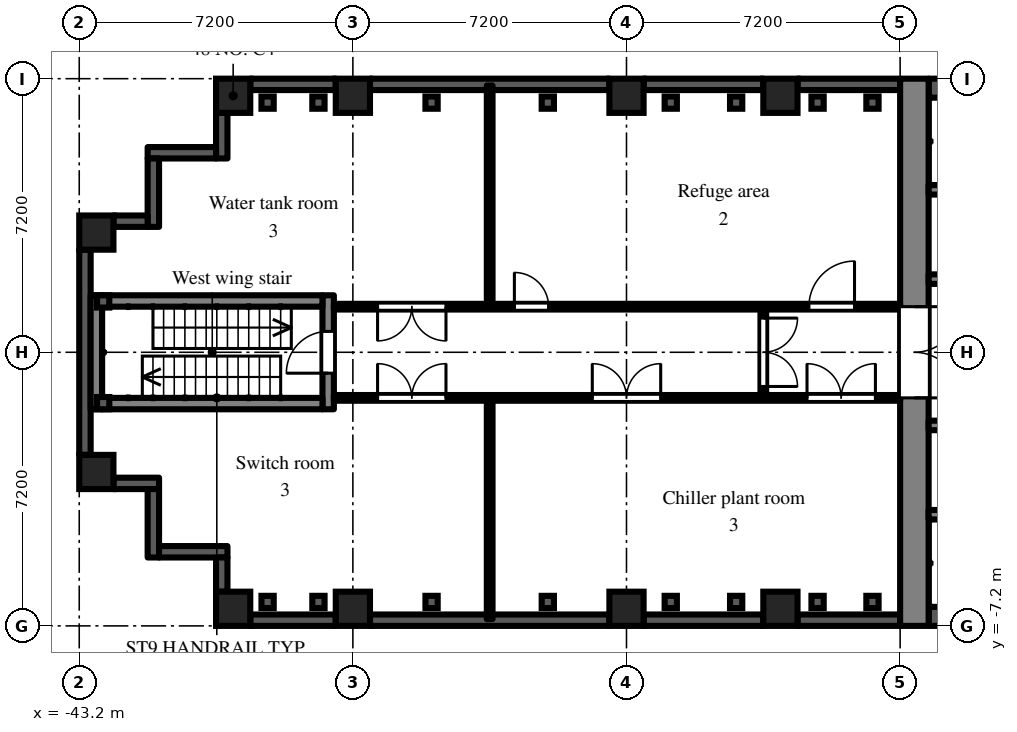
"""IFC4 building model, lengths in metres.
Left out: names, types, materials, properties, quantities, classifications, styles, units other than length and angle.
Written with IfcOpenShell. Run it as: python <this file> out.ifc"""

import sys

from ifc_helpers import new_model, si_unit, direction, frame, frame_2d, origin, origin_2d, place, context, subcontext, project, spatial, rectangle, extrude, element, fill, save


model = new_model("IFC4")
c1 = context("Model", 3, precision=1e-05, world=origin(), true_north=direction((0.0, 1.0)))
c2 = subcontext(c1, "Body", "Model", "MODEL_VIEW")
j1 = project(units=[si_unit("LENGTHUNIT", "METRE"), si_unit("PLANEANGLEUNIT", "RADIAN")], contexts=[c1])
p1 = place(None, origin())
s1 = spatial("IfcSite", under=j1, at=p1, CompositionType="ELEMENT")
p2 = place(p1, origin())
s2 = spatial("IfcBuilding", under=s1, at=p2, CompositionType="ELEMENT")
p3 = place(p2, frame((0.0, 0.0, 111.9)))
s3 = spatial("IfcBuildingStorey", under=s2, at=p3, CompositionType="ELEMENT", Elevation=111.9)
for number, where, z_axis, x_axis in (
    (1, (-42.75, -3.15, 0.0), (0.0, 0.0, 1.0), (1.0, 0.0, 0.0)),
    (2, (-42.75, 3.15, 0.0), (0.0, 0.0, 1.0), (1.0, 0.0, 0.0)),
    (3, (-39.15, -6.75, 0.0), (0.0, 0.0, 1.0), (1.0, 0.0, 0.0)),
    (4, (-39.15, 6.75, 0.0), (0.0, 0.0, 1.0), (1.0, 0.0, 0.0)),
    (5, (-36.0, -6.75, 0.0), (0.0, 0.0, 1.0), (1.0, 0.0, 0.0)),
    (6, (-36.0, 6.75, 0.0), (0.0, 0.0, 1.0), (1.0, 0.0, 0.0)),
    (7, (-28.8, -6.75, 0.0), (0.0, 0.0, 1.0), (1.0, 0.0, 0.0)),
    (8, (-28.8, 6.75, 0.0), (0.0, 0.0, 1.0), (1.0, 0.0, 0.0)),
    (9, (-24.75, -6.75, 0.0), (0.0, 0.0, 1.0), (1.0, 0.0, 0.0)),
    (10, (-24.75, 6.75, 0.0), (0.0, 0.0, 1.0), (1.0, 0.0, 0.0)),
):
    element("IfcColumn", number, at=place(p3, frame(where, z_axis=z_axis, x_axis=x_axis)), inside=s3, PredefinedType="COLUMN", context=c2, shape_type="SweptSolid", body=[
        extrude(rectangle(XDim=0.9, YDim=0.9, at=origin_2d()), origin(), (0.0, 0.0, 1.0), 4.2),
    ])
p4 = place(p3, frame((-21.6, 7.05, 0.0), z_axis=(0.0, 0.0, 1.0), x_axis=(-1.0, 0.0, 0.0)))
e11 = element("IfcWall", 11, at=p4, inside=s3, PredefinedType="SOLIDWALL", context=c2, shape_type="SweptSolid", body=[
    extrude(rectangle(XDim=2.7, YDim=0.3, at=frame_2d((1.35, 0.0))), origin(), (0.0, 0.0, 1.0), 3.4),
])
p5 = place(p3, frame((-25.2, 7.05, 0.0), z_axis=(0.0, 0.0, 1.0), x_axis=(-1.0, 0.0, 0.0)))
e12 = element("IfcWall", 12, at=p5, inside=s3, PredefinedType="SOLIDWALL", context=c2, shape_type="SweptSolid", body=[
    extrude(rectangle(XDim=3.15, YDim=0.3, at=frame_2d((1.575, 0.0))), origin(), (0.0, 0.0, 1.0), 3.4),
])
p6 = place(p3, frame((-29.25, 7.05, 0.0), z_axis=(0.0, 0.0, 1.0), x_axis=(-1.0, 0.0, 0.0)))
e13 = element("IfcWall", 13, at=p6, inside=s3, PredefinedType="SOLIDWALL", context=c2, shape_type="SweptSolid", body=[
    extrude(rectangle(XDim=6.3, YDim=0.3, at=frame_2d((3.15, 0.0))), origin(), (0.0, 0.0, 1.0), 3.4),
])
p7 = place(p3, frame((-36.45, 7.05, 0.0), z_axis=(0.0, 0.0, 1.0), x_axis=(-1.0, 0.0, 0.0)))
e14 = element("IfcWall", 14, at=p7, inside=s3, PredefinedType="SOLIDWALL", context=c2, shape_type="SweptSolid", body=[
    extrude(rectangle(XDim=2.25, YDim=0.3, at=frame_2d((1.125, 0.0))), origin(), (0.0, 0.0, 1.0), 3.4),
])
p8 = place(p3, frame((-39.45, 6.3, 0.0), z_axis=(0.0, 0.0, 1.0), x_axis=(0.0, -1.0, 0.0)))
e15 = element("IfcWall", 15, at=p8, inside=s3, PredefinedType="SOLIDWALL", context=c2, shape_type="SweptSolid", body=[
    extrude(rectangle(XDim=1.2, YDim=0.3, at=frame_2d((0.6, 0.0))), origin(), (0.0, 0.0, 1.0), 3.8),
])
p9 = place(p3, frame((-39.6, 5.25, 0.0), z_axis=(0.0, 0.0, 1.0), x_axis=(-1.0, 0.0, 0.0)))
e16 = element("IfcWall", 16, at=p9, inside=s3, PredefinedType="SOLIDWALL", context=c2, shape_type="SweptSolid", body=[
    extrude(rectangle(XDim=1.8, YDim=0.3, at=frame_2d((0.9, 0.0))), origin(), (0.0, 0.0, 1.0), 3.8),
])
p10 = place(p3, frame((-41.25, 5.1, 0.0), z_axis=(0.0, 0.0, 1.0), x_axis=(0.0, -1.0, 0.0)))
e17 = element("IfcWall", 17, at=p10, inside=s3, PredefinedType="SOLIDWALL", context=c2, shape_type="SweptSolid", body=[
    extrude(rectangle(XDim=1.8, YDim=0.3, at=frame_2d((0.9, 0.0))), origin(), (0.0, 0.0, 1.0), 3.8),
])
p11 = place(p3, frame((-41.4, 3.45, 0.0), z_axis=(0.0, 0.0, 1.0), x_axis=(-1.0, 0.0, 0.0)))
e18 = element("IfcWall", 18, at=p11, inside=s3, PredefinedType="SOLIDWALL", context=c2, shape_type="SweptSolid", body=[
    extrude(rectangle(XDim=0.9, YDim=0.3, at=frame_2d((0.45, 0.0))), origin(), (0.0, 0.0, 1.0), 3.8),
])
p12 = place(p3, frame((-43.05, 2.7, 0.0), z_axis=(0.0, 0.0, 1.0), x_axis=(0.0, -1.0, 0.0)))
e19 = element("IfcWall", 19, at=p12, inside=s3, PredefinedType="SOLIDWALL", context=c2, shape_type="SweptSolid", body=[
    extrude(rectangle(XDim=5.4, YDim=0.3, at=frame_2d((2.7, 0.0))), origin(), (0.0, 0.0, 1.0), 3.4),
])
p13 = place(p3, frame((-42.3, -3.45, 0.0), z_axis=(0.0, 0.0, 1.0), x_axis=(1.0, 0.0, 0.0)))
e20 = element("IfcWall", 20, at=p13, inside=s3, PredefinedType="SOLIDWALL", context=c2, shape_type="SweptSolid", body=[
    extrude(rectangle(XDim=1.2, YDim=0.3, at=frame_2d((0.6, 0.0))), origin(), (0.0, 0.0, 1.0), 3.8),
])
p14 = place(p3, frame((-41.25, -3.6, 0.0), z_axis=(0.0, 0.0, 1.0), x_axis=(0.0, -1.0, 0.0)))
e21 = element("IfcWall", 21, at=p14, inside=s3, PredefinedType="SOLIDWALL", context=c2, shape_type="SweptSolid", body=[
    extrude(rectangle(XDim=1.8, YDim=0.3, at=frame_2d((0.9, 0.0))), origin(), (0.0, 0.0, 1.0), 3.8),
])
p15 = place(p3, frame((-41.1, -5.25, 0.0), z_axis=(0.0, 0.0, 1.0), x_axis=(1.0, 0.0, 0.0)))
e22 = element("IfcWall", 22, at=p15, inside=s3, PredefinedType="SOLIDWALL", context=c2, shape_type="SweptSolid", body=[
    extrude(rectangle(XDim=1.8, YDim=0.3, at=frame_2d((0.9, 0.0))), origin(), (0.0, 0.0, 1.0), 3.8),
])
p16 = place(p3, frame((-39.45, -5.4, 0.0), z_axis=(0.0, 0.0, 1.0), x_axis=(0.0, -1.0, 0.0)))
e23 = element("IfcWall", 23, at=p16, inside=s3, PredefinedType="SOLIDWALL", context=c2, shape_type="SweptSolid", body=[
    extrude(rectangle(XDim=0.9, YDim=0.3, at=frame_2d((0.45, 0.0))), origin(), (0.0, 0.0, 1.0), 3.8),
])
p17 = place(p3, frame((-38.7, -7.05, 0.0), z_axis=(0.0, 0.0, 1.0), x_axis=(1.0, 0.0, 0.0)))
e24 = element("IfcWall", 24, at=p17, inside=s3, PredefinedType="SOLIDWALL", context=c2, shape_type="SweptSolid", body=[
    extrude(rectangle(XDim=2.25, YDim=0.3, at=frame_2d((1.125, 0.0))), origin(), (0.0, 0.0, 1.0), 3.4),
])
p18 = place(p3, frame((-35.55, -7.05, 0.0), z_axis=(0.0, 0.0, 1.0), x_axis=(1.0, 0.0, 0.0)))
e25 = element("IfcWall", 25, at=p18, inside=s3, PredefinedType="SOLIDWALL", context=c2, shape_type="SweptSolid", body=[
    extrude(rectangle(XDim=6.3, YDim=0.3, at=frame_2d((3.15, 0.0))), origin(), (0.0, 0.0, 1.0), 3.4),
])
p19 = place(p3, frame((-28.35, -7.05, 0.0), z_axis=(0.0, 0.0, 1.0), x_axis=(1.0, 0.0, 0.0)))
e26 = element("IfcWall", 26, at=p19, inside=s3, PredefinedType="SOLIDWALL", context=c2, shape_type="SweptSolid", body=[
    extrude(rectangle(XDim=3.15, YDim=0.3, at=frame_2d((1.575, 0.0))), origin(), (0.0, 0.0, 1.0), 3.4),
])
p20 = place(p3, frame((-24.3, -7.05, 0.0), z_axis=(0.0, 0.0, 1.0), x_axis=(1.0, 0.0, 0.0)))
e27 = element("IfcWall", 27, at=p20, inside=s3, PredefinedType="SOLIDWALL", context=c2, shape_type="SweptSolid", body=[
    extrude(rectangle(XDim=2.7, YDim=0.3, at=frame_2d((1.35, 0.0))), origin(), (0.0, 0.0, 1.0), 3.4),
])
p21 = place(p3, frame((-21.225, -7.2, 0.0), z_axis=(0.0, 0.0, 1.0), x_axis=(0.0, 1.0, 0.0)))
e28 = element("IfcWall", 28, at=p21, inside=s3, PredefinedType="SHEAR", context=c2, shape_type="SweptSolid", body=[
    extrude(rectangle(XDim=14.4, YDim=0.75, at=frame_2d((7.2, 0.0))), origin(), (0.0, 0.0, 1.0), 3.8),
])
p22 = place(p21, frame((6.0, 0.0, 0.0)))
e29 = element("IfcOpeningElement", 29, at=p22, cuts=e28, PredefinedType="OPENING", context=c2, shape_type="SweptSolid", body=[
    extrude(rectangle(XDim=2.4, YDim=2.2, at=frame_2d((1.2, 1.1))), frame((0.0, 0.385, 0.0), z_axis=(0.0, -1.0, 0.0), x_axis=(1.0, 0.0, 0.0)), (0.0, 0.0, 1.0), 0.77),
])
p23 = place(p3, frame((-7.9, 6.95, 0.0), z_axis=(0.0, 0.0, 1.0), x_axis=(-1.0, 0.0, 0.0)))
e30 = element("IfcWall", 30, at=p23, inside=s3, PredefinedType="SHEAR", context=c2, shape_type="SweptSolid", body=[
    extrude(rectangle(XDim=12.95, YDim=0.5, at=frame_2d((6.475, 0.0))), origin(), (0.0, 0.0, 1.0), 3.8),
])
p24 = place(p3, frame((-7.9, 1.925, 0.0), z_axis=(0.0, 0.0, 1.0), x_axis=(-1.0, 0.0, 0.0)))
e31 = element("IfcWall", 31, at=p24, inside=s3, PredefinedType="SHEAR", context=c2, shape_type="SweptSolid", body=[
    extrude(rectangle(XDim=12.95, YDim=0.25, at=frame_2d((6.475, 0.0))), origin(), (0.0, 0.0, 1.0), 3.8),
])
p25 = place(p24, frame((0.525, 0.0, 0.0)))
e32 = element("IfcOpeningElement", 32, at=p25, cuts=e31, PredefinedType="OPENING", context=c2, shape_type="SweptSolid", body=[
    extrude(rectangle(XDim=0.9, YDim=2.1, at=frame_2d((0.45, 1.05))), frame((0.0, 0.135, 0.0), z_axis=(0.0, -1.0, 0.0), x_axis=(1.0, 0.0, 0.0)), (0.0, 0.0, 1.0), 0.27),
])
p26 = place(p24, frame((2.625, 0.0, 0.0)))
e33 = element("IfcOpeningElement", 33, at=p26, cuts=e31, PredefinedType="OPENING", context=c2, shape_type="SweptSolid", body=[
    extrude(rectangle(XDim=1.1, YDim=2.1, at=frame_2d((0.55, 1.05))), frame((0.0, 0.135, 0.0), z_axis=(0.0, -1.0, 0.0), x_axis=(1.0, 0.0, 0.0)), (0.0, 0.0, 1.0), 0.27),
])
p27 = place(p3, frame((-12.3, 4.275, 0.0), z_axis=(0.0, 0.0, 1.0), x_axis=(-1.0, 0.0, 0.0)))
e34 = element("IfcWall", 34, at=p27, inside=s3, PredefinedType="SHEAR", context=c2, shape_type="SweptSolid", body=[
    extrude(rectangle(XDim=8.55, YDim=0.25, at=frame_2d((4.275, 0.0))), origin(), (0.0, 0.0, 1.0), 3.8),
])
p28 = place(p3, frame((-7.9, -6.95, 0.0), z_axis=(0.0, 0.0, 1.0), x_axis=(-1.0, 0.0, 0.0)))
e35 = element("IfcWall", 35, at=p28, inside=s3, PredefinedType="SHEAR", context=c2, shape_type="SweptSolid", body=[
    extrude(rectangle(XDim=12.95, YDim=0.5, at=frame_2d((6.475, 0.0))), origin(), (0.0, 0.0, 1.0), 3.8),
])
p29 = place(p3, frame((-7.9, -1.925, 0.0), z_axis=(0.0, 0.0, 1.0), x_axis=(-1.0, 0.0, 0.0)))
e36 = element("IfcWall", 36, at=p29, inside=s3, PredefinedType="SHEAR", context=c2, shape_type="SweptSolid", body=[
    extrude(rectangle(XDim=12.95, YDim=0.25, at=frame_2d((6.475, 0.0))), origin(), (0.0, 0.0, 1.0), 3.8),
])
p30 = place(p29, frame((4.825, 0.0, 0.0)))
e37 = element("IfcOpeningElement", 37, at=p30, cuts=e36, PredefinedType="OPENING", context=c2, shape_type="SweptSolid", body=[
    extrude(rectangle(XDim=1.1, YDim=2.1, at=frame_2d((0.55, 1.05))), frame((0.0, 0.135, 0.0), z_axis=(0.0, -1.0, 0.0), x_axis=(1.0, 0.0, 0.0)), (0.0, 0.0, 1.0), 0.27),
])
p31 = place(p29, frame((7.025, 0.0, 0.0)))
e38 = element("IfcOpeningElement", 38, at=p31, cuts=e36, PredefinedType="OPENING", context=c2, shape_type="SweptSolid", body=[
    extrude(rectangle(XDim=1.1, YDim=2.1, at=frame_2d((0.55, 1.05))), frame((0.0, 0.135, 0.0), z_axis=(0.0, -1.0, 0.0), x_axis=(1.0, 0.0, 0.0)), (0.0, 0.0, 1.0), 0.27),
])
p32 = place(p29, frame((9.225, 0.0, 0.0)))
e39 = element("IfcOpeningElement", 39, at=p32, cuts=e36, PredefinedType="OPENING", context=c2, shape_type="SweptSolid", body=[
    extrude(rectangle(XDim=1.1, YDim=2.1, at=frame_2d((0.55, 1.05))), frame((0.0, 0.135, 0.0), z_axis=(0.0, -1.0, 0.0), x_axis=(1.0, 0.0, 0.0)), (0.0, 0.0, 1.0), 0.27),
])
p33 = place(p29, frame((0.525, 0.0, 0.0)))
e40 = element("IfcOpeningElement", 40, at=p33, cuts=e36, PredefinedType="OPENING", context=c2, shape_type="SweptSolid", body=[
    extrude(rectangle(XDim=0.9, YDim=2.1, at=frame_2d((0.45, 1.05))), frame((0.0, 0.135, 0.0), z_axis=(0.0, -1.0, 0.0), x_axis=(1.0, 0.0, 0.0)), (0.0, 0.0, 1.0), 0.27),
])
p34 = place(p29, frame((2.625, 0.0, 0.0)))
e41 = element("IfcOpeningElement", 41, at=p34, cuts=e36, PredefinedType="OPENING", context=c2, shape_type="SweptSolid", body=[
    extrude(rectangle(XDim=1.1, YDim=2.1, at=frame_2d((0.55, 1.05))), frame((0.0, 0.135, 0.0), z_axis=(0.0, -1.0, 0.0), x_axis=(1.0, 0.0, 0.0)), (0.0, 0.0, 1.0), 0.27),
])
p35 = place(p3, frame((-12.3, -4.275, 0.0), z_axis=(0.0, 0.0, 1.0), x_axis=(-1.0, 0.0, 0.0)))
e42 = element("IfcWall", 42, at=p35, inside=s3, PredefinedType="SHEAR", context=c2, shape_type="SweptSolid", body=[
    extrude(rectangle(XDim=8.55, YDim=0.25, at=frame_2d((4.275, 0.0))), origin(), (0.0, 0.0, 1.0), 3.8),
])
p36 = place(p3, frame((-36.65, -1.5, 0.0), z_axis=(0.0, 0.0, 1.0), x_axis=(0.0, 1.0, 0.0)))
e43 = element("IfcWall", 43, at=p36, inside=s3, PredefinedType="SHEAR", context=c2, shape_type="SweptSolid", body=[
    extrude(rectangle(XDim=3.0, YDim=0.3, at=frame_2d((1.5, 0.0))), origin(), (0.0, 0.0, 1.0), 3.8),
])
p37 = place(p36, frame((0.95, 0.0, 0.0)))
e44 = element("IfcOpeningElement", 44, at=p37, cuts=e43, PredefinedType="OPENING", context=c2, shape_type="SweptSolid", body=[
    extrude(rectangle(XDim=1.1, YDim=2.1, at=frame_2d((0.55, 1.05))), frame((0.0, 0.16, 0.0), z_axis=(0.0, -1.0, 0.0), x_axis=(1.0, 0.0, 0.0)), (0.0, 0.0, 1.0), 0.32),
])
p38 = place(p3, frame((-42.75, -1.5, 0.0), z_axis=(0.0, 0.0, 1.0), x_axis=(0.0, 1.0, 0.0)))
e45 = element("IfcWall", 45, at=p38, inside=s3, PredefinedType="SHEAR", context=c2, shape_type="SweptSolid", body=[
    extrude(rectangle(XDim=3.0, YDim=0.3, at=frame_2d((1.5, 0.0))), origin(), (0.0, 0.0, 1.0), 3.8),
])
for number, where, z_axis, x_axis in (
    (46, (-36.8, -1.35, 0.0), (0.0, 0.0, 1.0), (-1.0, 0.0, 0.0)),
    (47, (-36.8, 1.35, 0.0), (0.0, 0.0, 1.0), (-1.0, 0.0, 0.0)),
):
    element("IfcWall", number, at=place(p3, frame(where, z_axis=z_axis, x_axis=x_axis)), inside=s3, PredefinedType="SHEAR", context=c2, shape_type="SweptSolid", body=[
        extrude(rectangle(XDim=5.8, YDim=0.3, at=frame_2d((2.9, 0.0))), origin(), (0.0, 0.0, 1.0), 3.8),
    ])
p39 = place(p3, frame((-36.5, -1.2, 0.0), z_axis=(0.0, 0.0, 1.0), x_axis=(1.0, 0.0, 0.0)))
e48 = element("IfcWall", 48, at=p39, inside=s3, PredefinedType="PARTITIONING", context=c2, shape_type="SweptSolid", body=[
    extrude(rectangle(XDim=14.9, YDim=0.15, at=frame_2d((7.45, 0.0))), origin(), (0.0, 0.0, 1.0), 3.8),
])
p40 = place(p39, frame((6.8, 0.0, 0.0)))
e49 = element("IfcOpeningElement", 49, at=p40, cuts=e48, PredefinedType="OPENING", context=c2, shape_type="SweptSolid", body=[
    extrude(rectangle(XDim=1.8, YDim=2.1, at=frame_2d((0.9, 1.05))), frame((0.0, 0.085, 0.0), z_axis=(0.0, -1.0, 0.0), x_axis=(1.0, 0.0, 0.0)), (0.0, 0.0, 1.0), 0.17),
])
p41 = place(p39, frame((12.45, 0.0, 0.0)))
e50 = element("IfcOpeningElement", 50, at=p41, cuts=e48, PredefinedType="OPENING", context=c2, shape_type="SweptSolid", body=[
    extrude(rectangle(XDim=1.8, YDim=2.1, at=frame_2d((0.9, 1.05))), frame((0.0, 0.085, 0.0), z_axis=(0.0, -1.0, 0.0), x_axis=(1.0, 0.0, 0.0)), (0.0, 0.0, 1.0), 0.17),
])
p42 = place(p39, frame((1.15, 0.0, 0.0)))
e51 = element("IfcOpeningElement", 51, at=p42, cuts=e48, PredefinedType="OPENING", context=c2, shape_type="SweptSolid", body=[
    extrude(rectangle(XDim=1.8, YDim=2.1, at=frame_2d((0.9, 1.05))), frame((0.0, 0.085, 0.0), z_axis=(0.0, -1.0, 0.0), x_axis=(1.0, 0.0, 0.0)), (0.0, 0.0, 1.0), 0.17),
])
p43 = place(p3, frame((-36.5, 1.2, 0.0), z_axis=(0.0, 0.0, 1.0), x_axis=(1.0, 0.0, 0.0)))
e52 = element("IfcWall", 52, at=p43, inside=s3, PredefinedType="PARTITIONING", context=c2, shape_type="SweptSolid", body=[
    extrude(rectangle(XDim=14.9, YDim=0.15, at=frame_2d((7.45, 0.0))), origin(), (0.0, 0.0, 1.0), 3.8),
])
p44 = place(p43, frame((4.75, 0.0, 0.0)))
e53 = element("IfcOpeningElement", 53, at=p44, cuts=e52, PredefinedType="OPENING", context=c2, shape_type="SweptSolid", body=[
    extrude(rectangle(XDim=0.9, YDim=2.1, at=frame_2d((0.45, 1.05))), frame((0.0, 0.085, 0.0), z_axis=(0.0, -1.0, 0.0), x_axis=(1.0, 0.0, 0.0)), (0.0, 0.0, 1.0), 0.17),
])
p45 = place(p43, frame((12.5, 0.0, 0.0)))
e54 = element("IfcOpeningElement", 54, at=p45, cuts=e52, PredefinedType="OPENING", context=c2, shape_type="SweptSolid", body=[
    extrude(rectangle(XDim=1.2, YDim=2.1, at=frame_2d((0.6, 1.05))), frame((0.0, 0.085, 0.0), z_axis=(0.0, -1.0, 0.0), x_axis=(1.0, 0.0, 0.0)), (0.0, 0.0, 1.0), 0.17),
])
p46 = place(p43, frame((1.15, 0.0, 0.0)))
e55 = element("IfcOpeningElement", 55, at=p46, cuts=e52, PredefinedType="OPENING", context=c2, shape_type="SweptSolid", body=[
    extrude(rectangle(XDim=1.8, YDim=2.1, at=frame_2d((0.9, 1.05))), frame((0.0, 0.085, 0.0), z_axis=(0.0, -1.0, 0.0), x_axis=(1.0, 0.0, 0.0)), (0.0, 0.0, 1.0), 0.17),
])
for number, where, z_axis, x_axis in (
    (56, (-32.4, -7.02, 0.0), (0.0, 0.0, 1.0), (0.0, 1.0, 0.0)),
    (57, (-32.4, 1.275, 0.0), (0.0, 0.0, 1.0), (0.0, 1.0, 0.0)),
):
    element("IfcWall", number, at=place(p3, frame(where, z_axis=z_axis, x_axis=x_axis)), inside=s3, PredefinedType="PARTITIONING", context=c2, shape_type="SweptSolid", body=[
        extrude(rectangle(XDim=5.745, YDim=0.15, at=frame_2d((2.873, 0.0))), origin(), (0.0, 0.0, 1.0), 3.8),
    ])
p47 = place(p3, frame((-25.2, -1.125, 0.0), z_axis=(0.0, 0.0, 1.0), x_axis=(0.0, 1.0, 0.0)))
e58 = element("IfcWall", 58, at=p47, inside=s3, PredefinedType="PARTITIONING", context=c2, shape_type="SweptSolid", body=[
    extrude(rectangle(XDim=2.25, YDim=0.15, at=frame_2d((1.125, 0.0))), origin(), (0.0, 0.0, 1.0), 3.8),
])
p48 = place(p47, frame((0.225, 0.0, 0.0)))
e59 = element("IfcOpeningElement", 59, at=p48, cuts=e58, PredefinedType="OPENING", context=c2, shape_type="SweptSolid", body=[
    extrude(rectangle(XDim=1.8, YDim=2.1, at=frame_2d((0.9, 1.05))), frame((0.0, 0.085, 0.0), z_axis=(0.0, -1.0, 0.0), x_axis=(1.0, 0.0, 0.0)), (0.0, 0.0, 1.0), 0.17),
])
p49 = place(p22, frame((2.4, 0.0, 0.0), z_axis=(0.0, 0.0, 1.0), x_axis=(-1.0, 0.0, 0.0)))
e60 = element("IfcDoor", 60, at=p49, inside=s3, OperationType="DOUBLE_DOOR_DOUBLE_SWING", PredefinedType="DOOR", context=c2, shape_type="SweptSolid", body=[
    extrude(rectangle(XDim=2.4, YDim=2.2, at=frame_2d((1.2, 1.1))), frame((0.0, 0.025, 0.0), z_axis=(0.0, -1.0, 0.0), x_axis=(1.0, 0.0, 0.0)), (0.0, 0.0, 1.0), 0.05),
])
fill(e29, e60)
p50 = place(p37, origin())
e61 = element("IfcDoor", 61, at=p50, inside=s3, OperationType="SINGLE_SWING_LEFT", PredefinedType="DOOR", context=c2, shape_type="SweptSolid", body=[
    extrude(rectangle(XDim=1.1, YDim=2.1, at=frame_2d((0.55, 1.05))), frame((0.0, 0.025, 0.0), z_axis=(0.0, -1.0, 0.0), x_axis=(1.0, 0.0, 0.0)), (0.0, 0.0, 1.0), 0.05),
])
fill(e44, e61)
p51 = place(p48, frame((1.8, 0.0, 0.0), z_axis=(0.0, 0.0, 1.0), x_axis=(-1.0, 0.0, 0.0)))
e62 = element("IfcDoor", 62, at=p51, inside=s3, OperationType="DOUBLE_DOOR_DOUBLE_SWING", PredefinedType="DOOR", context=c2, shape_type="SweptSolid", body=[
    extrude(rectangle(XDim=1.8, YDim=2.1, at=frame_2d((0.9, 1.05))), frame((0.0, 0.025, 0.0), z_axis=(0.0, -1.0, 0.0), x_axis=(1.0, 0.0, 0.0)), (0.0, 0.0, 1.0), 0.05),
])
fill(e59, e62)
p52 = place(p40, origin())
e63 = element("IfcDoor", 63, at=p52, inside=s3, OperationType="DOUBLE_DOOR_DOUBLE_SWING", PredefinedType="DOOR", context=c2, shape_type="SweptSolid", body=[
    extrude(rectangle(XDim=1.8, YDim=2.1, at=frame_2d((0.9, 1.05))), frame((0.0, 0.025, 0.0), z_axis=(0.0, -1.0, 0.0), x_axis=(1.0, 0.0, 0.0)), (0.0, 0.0, 1.0), 0.05),
])
fill(e49, e63)
p53 = place(p41, origin())
e64 = element("IfcDoor", 64, at=p53, inside=s3, OperationType="DOUBLE_DOOR_DOUBLE_SWING", PredefinedType="DOOR", context=c2, shape_type="SweptSolid", body=[
    extrude(rectangle(XDim=1.8, YDim=2.1, at=frame_2d((0.9, 1.05))), frame((0.0, 0.025, 0.0), z_axis=(0.0, -1.0, 0.0), x_axis=(1.0, 0.0, 0.0)), (0.0, 0.0, 1.0), 0.05),
])
fill(e50, e64)
p54 = place(p42, origin())
e65 = element("IfcDoor", 65, at=p54, inside=s3, OperationType="DOUBLE_DOOR_DOUBLE_SWING", PredefinedType="DOOR", context=c2, shape_type="SweptSolid", body=[
    extrude(rectangle(XDim=1.8, YDim=2.1, at=frame_2d((0.9, 1.05))), frame((0.0, 0.025, 0.0), z_axis=(0.0, -1.0, 0.0), x_axis=(1.0, 0.0, 0.0)), (0.0, 0.0, 1.0), 0.05),
])
fill(e51, e65)
p55 = place(p44, origin())
e66 = element("IfcDoor", 66, at=p55, inside=s3, OperationType="SINGLE_SWING_LEFT", PredefinedType="DOOR", context=c2, shape_type="SweptSolid", body=[
    extrude(rectangle(XDim=0.9, YDim=2.1, at=frame_2d((0.45, 1.05))), frame((0.0, 0.025, 0.0), z_axis=(0.0, -1.0, 0.0), x_axis=(1.0, 0.0, 0.0)), (0.0, 0.0, 1.0), 0.05),
])
fill(e53, e66)
p56 = place(p45, origin())
e67 = element("IfcDoor", 67, at=p56, inside=s3, OperationType="SINGLE_SWING_RIGHT", PredefinedType="DOOR", context=c2, shape_type="SweptSolid", body=[
    extrude(rectangle(XDim=1.2, YDim=2.1, at=frame_2d((0.6, 1.05))), frame((0.0, 0.025, 0.0), z_axis=(0.0, -1.0, 0.0), x_axis=(1.0, 0.0, 0.0)), (0.0, 0.0, 1.0), 0.05),
])
fill(e54, e67)
p57 = place(p46, frame((1.8, 0.0, 0.0), z_axis=(0.0, 0.0, 1.0), x_axis=(-1.0, 0.0, 0.0)))
e68 = element("IfcDoor", 68, at=p57, inside=s3, OperationType="DOUBLE_DOOR_DOUBLE_SWING", PredefinedType="DOOR", context=c2, shape_type="SweptSolid", body=[
    extrude(rectangle(XDim=1.8, YDim=2.1, at=frame_2d((0.9, 1.05))), frame((0.0, 0.025, 0.0), z_axis=(0.0, -1.0, 0.0), x_axis=(1.0, 0.0, 0.0)), (0.0, 0.0, 1.0), 0.05),
])
fill(e55, e68)
save(model, sys.argv[1])
